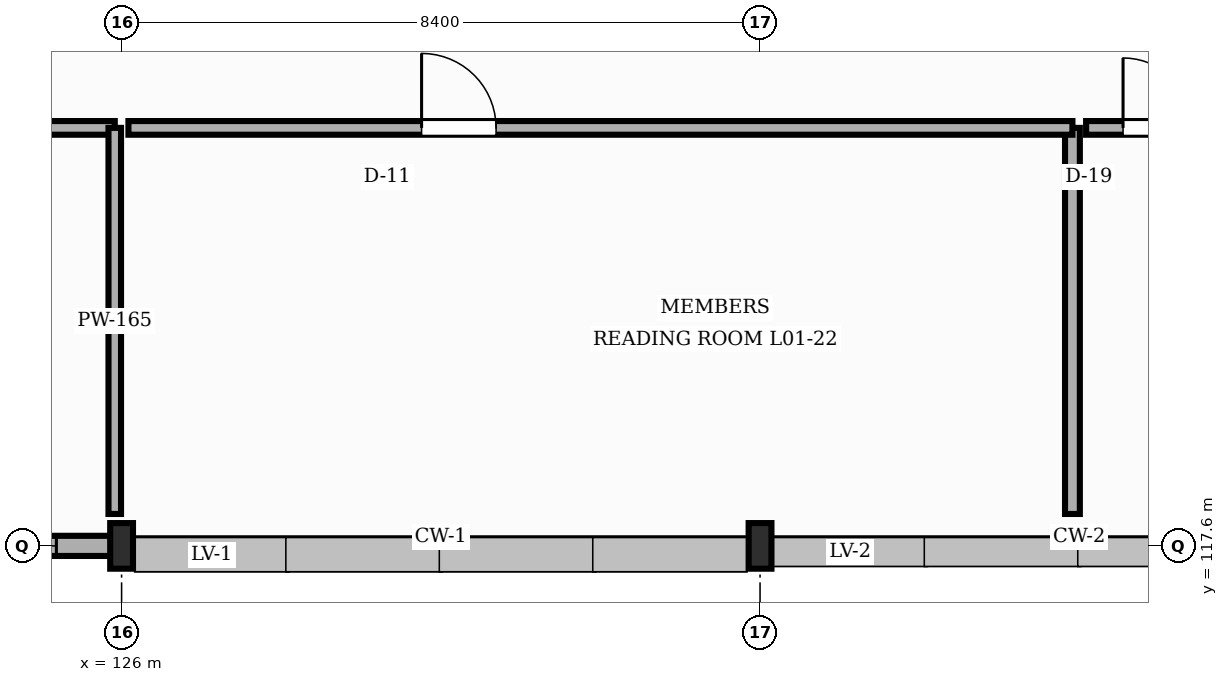
"""IFC4 building model, lengths in metres.
Left out: names, types, materials, properties, quantities, classifications, styles, units other than length and angle.
Written with IfcOpenShell. Run it as: python <this file> out.ifc"""

import sys

from ifc_helpers import new_model, si_unit, direction, frame, frame_2d, origin, origin_2d, place, context, subcontext, project, spatial, rectangle, i_section, extrude, element, fill, save


model = new_model("IFC4")
c1 = context("Model", 3, precision=1e-05, world=origin(), true_north=direction((0.0, 1.0)))
c2 = subcontext(c1, "Body", "Model", "MODEL_VIEW")
j1 = project(units=[si_unit("LENGTHUNIT", "METRE"), si_unit("PLANEANGLEUNIT", "RADIAN")], contexts=[c1])
p1 = place(None, origin())
s1 = spatial("IfcSite", under=j1, at=p1, CompositionType="ELEMENT")
p2 = place(p1, origin())
s2 = spatial("IfcBuilding", under=s1, at=p2, CompositionType="ELEMENT")
p3 = place(p2, frame((0.0, 0.0, 5.4)))
s3 = spatial("IfcBuildingStorey", under=s2, at=p3, CompositionType="ELEMENT", Elevation=5.4)
for number, where, z_axis, x_axis in (
    (1, (126.0, 117.6, 0.0), (0.0, 0.0, 1.0), (1.0, 0.0, 0.0)),
    (2, (134.4, 117.6, 0.0), (0.0, 0.0, 1.0), (1.0, 0.0, 0.0)),
):
    element("IfcColumn", number, at=place(p3, frame(where, z_axis=z_axis, x_axis=x_axis)), inside=s3, PredefinedType="COLUMN", context=c2, shape_type="SweptSolid", body=[
        extrude(i_section(OverallWidth=0.3, OverallDepth=0.6, WebThickness=0.015, FlangeThickness=0.03, FilletRadius=0.027, at=origin_2d()), origin(), (0.0, 0.0, 1.0), 4.5),
    ])
p4 = place(p3, frame((117.608, 117.6, 0.0), z_axis=(0.0, 0.0, 1.0), x_axis=(1.0, 0.0, 0.0)))
e3 = element("IfcWall", 3, at=p4, inside=s3, PredefinedType="STANDARD", context=c2, shape_type="SweptSolid", body=[
    extrude(rectangle(XDim=8.384, YDim=0.265, at=frame_2d((4.192, 0.0))), origin(), (0.0, 0.0, 1.0), 3.922),
])
p5 = place(p4, frame((0.85, 0.0, 0.9)))
e4 = element("IfcOpeningElement", 4, at=p5, cuts=e3, PredefinedType="OPENING", context=c2, shape_type="SweptSolid", body=[
    extrude(rectangle(XDim=1.72, YDim=1.25, at=frame_2d((0.86, 0.625))), frame((0.0, 0.142, 0.0), z_axis=(0.0, -1.0, 0.0), x_axis=(1.0, 0.0, 0.0)), (0.0, 0.0, 1.0), 0.285),
])
p6 = place(p4, frame((5.714, 0.0, 0.9)))
e5 = element("IfcOpeningElement", 5, at=p6, cuts=e3, PredefinedType="OPENING", context=c2, shape_type="SweptSolid", body=[
    extrude(rectangle(XDim=1.82, YDim=1.25, at=frame_2d((0.91, 0.625))), frame((0.0, 0.142, 0.0), z_axis=(0.0, -1.0, 0.0), x_axis=(1.0, 0.0, 0.0)), (0.0, 0.0, 1.0), 0.285),
])
p7 = place(p3, frame((113.49, 123.1, -0.004), z_axis=(0.0, 0.0, 1.0), x_axis=(1.0, 0.0, 0.0)))
e6 = element("IfcWall", 6, at=p7, inside=s3, PredefinedType="STANDARD", context=c2, shape_type="SweptSolid", body=[
    extrude(rectangle(XDim=12.42, YDim=0.18, at=frame_2d((6.21, 0.0))), origin(), (0.0, 0.0, 1.0), 4.294),
])
p8 = place(p7, frame((7.583, 0.0, 0.0)))
e7 = element("IfcOpeningElement", 7, at=p8, cuts=e6, PredefinedType="OPENING", context=c2, shape_type="SweptSolid", body=[
    extrude(rectangle(XDim=0.98, YDim=2.3, at=frame_2d((0.49, 1.15))), frame((0.0, 0.1, 0.0), z_axis=(0.0, -1.0, 0.0), x_axis=(1.0, 0.0, 0.0)), (0.0, 0.0, 1.0), 0.2),
])
p9 = place(p3, frame((125.91, 123.1, -0.004), z_axis=(0.0, 0.0, 1.0), x_axis=(0.0, -1.0, 0.0)))
e8 = element("IfcWall", 8, at=p9, inside=s3, PredefinedType="STANDARD", context=c2, shape_type="SweptSolid", body=[
    extrude(rectangle(XDim=5.08, YDim=0.165, at=frame_2d((2.54, 0.0))), origin(), (0.0, 0.0, 1.0), 3.886),
])
p10 = place(p3, frame((138.51, 123.1, -0.004), z_axis=(0.0, 0.0, 1.0), x_axis=(0.0, -1.0, 0.0)))
e9 = element("IfcWall", 9, at=p10, inside=s3, PredefinedType="STANDARD", context=c2, shape_type="SweptSolid", body=[
    extrude(rectangle(XDim=5.08, YDim=0.195, at=frame_2d((2.54, 0.0))), origin(), (0.0, 0.0, 1.0), 4.294),
])
p11 = place(p3, frame((126.09, 123.1, -0.004), z_axis=(0.0, 0.0, 1.0), x_axis=(1.0, 0.0, 0.0)))
e10 = element("IfcWall", 10, at=p11, inside=s3, PredefinedType="STANDARD", context=c2, shape_type="SweptSolid", body=[
    extrude(rectangle(XDim=12.42, YDim=0.18, at=frame_2d((6.21, 0.0))), origin(), (0.0, 0.0, 1.0), 4.294),
])
p12 = place(p11, frame((3.857, 0.0, 0.0)))
e11 = element("IfcOpeningElement", 11, at=p12, cuts=e10, PredefinedType="OPENING", context=c2, shape_type="SweptSolid", body=[
    extrude(rectangle(XDim=0.98, YDim=2.14, at=frame_2d((0.49, 1.07))), frame((0.0, 0.1, 0.0), z_axis=(0.0, -1.0, 0.0), x_axis=(1.0, 0.0, 0.0)), (0.0, 0.0, 1.0), 0.2),
])
p13 = place(p3, frame((138.69, 123.1, -0.004), z_axis=(0.0, 0.0, 1.0), x_axis=(1.0, 0.0, 0.0)))
e12 = element("IfcWall", 12, at=p13, inside=s3, PredefinedType="STANDARD", context=c2, shape_type="SweptSolid", body=[
    extrude(rectangle(XDim=4.73, YDim=0.18, at=frame_2d((2.365, 0.0))), origin(), (0.0, 0.0, 1.0), 4.294),
])
p14 = place(p13, frame((0.486, 0.0, 0.0)))
e13 = element("IfcOpeningElement", 13, at=p14, cuts=e12, PredefinedType="OPENING", context=c2, shape_type="SweptSolid", body=[
    extrude(rectangle(XDim=0.92, YDim=2.22, at=frame_2d((0.46, 1.11))), frame((0.0, 0.1, 0.0), z_axis=(0.0, -1.0, 0.0), x_axis=(1.0, 0.0, 0.0)), (0.0, 0.0, 1.0), 0.2),
])
p15 = place(p6, origin())
e14 = element("IfcWindow", 14, at=p15, inside=s3, PartitioningType="SINGLE_PANEL", PredefinedType="WINDOW", context=c2, shape_type="SweptSolid", body=[
    extrude(rectangle(XDim=1.82, YDim=1.25, at=frame_2d((0.91, 0.625))), frame((0.0, 0.03, 0.0), z_axis=(0.0, -1.0, 0.0), x_axis=(1.0, 0.0, 0.0)), (0.0, 0.0, 1.0), 0.06),
])
fill(e5, e14)
p16 = place(p12, origin())
e15 = element("IfcDoor", 15, at=p16, inside=s3, OperationType="SINGLE_SWING_LEFT", PredefinedType="DOOR", context=c2, shape_type="SweptSolid", body=[
    extrude(rectangle(XDim=0.98, YDim=2.14, at=frame_2d((0.49, 1.07))), frame((0.0, 0.025, 0.0), z_axis=(0.0, -1.0, 0.0), x_axis=(1.0, 0.0, 0.0)), (0.0, 0.0, 1.0), 0.05),
])
fill(e11, e15)
p17 = place(p14, origin())
e16 = element("IfcDoor", 16, at=p17, inside=s3, OperationType="SINGLE_SWING_LEFT", PredefinedType="DOOR", context=c2, shape_type="SweptSolid", body=[
    extrude(rectangle(XDim=0.92, YDim=2.22, at=frame_2d((0.46, 1.11))), frame((0.0, 0.025, 0.0), z_axis=(0.0, -1.0, 0.0), x_axis=(1.0, 0.0, 0.0)), (0.0, 0.0, 1.0), 0.05),
])
fill(e13, e16)
save(model, sys.argv[1])
